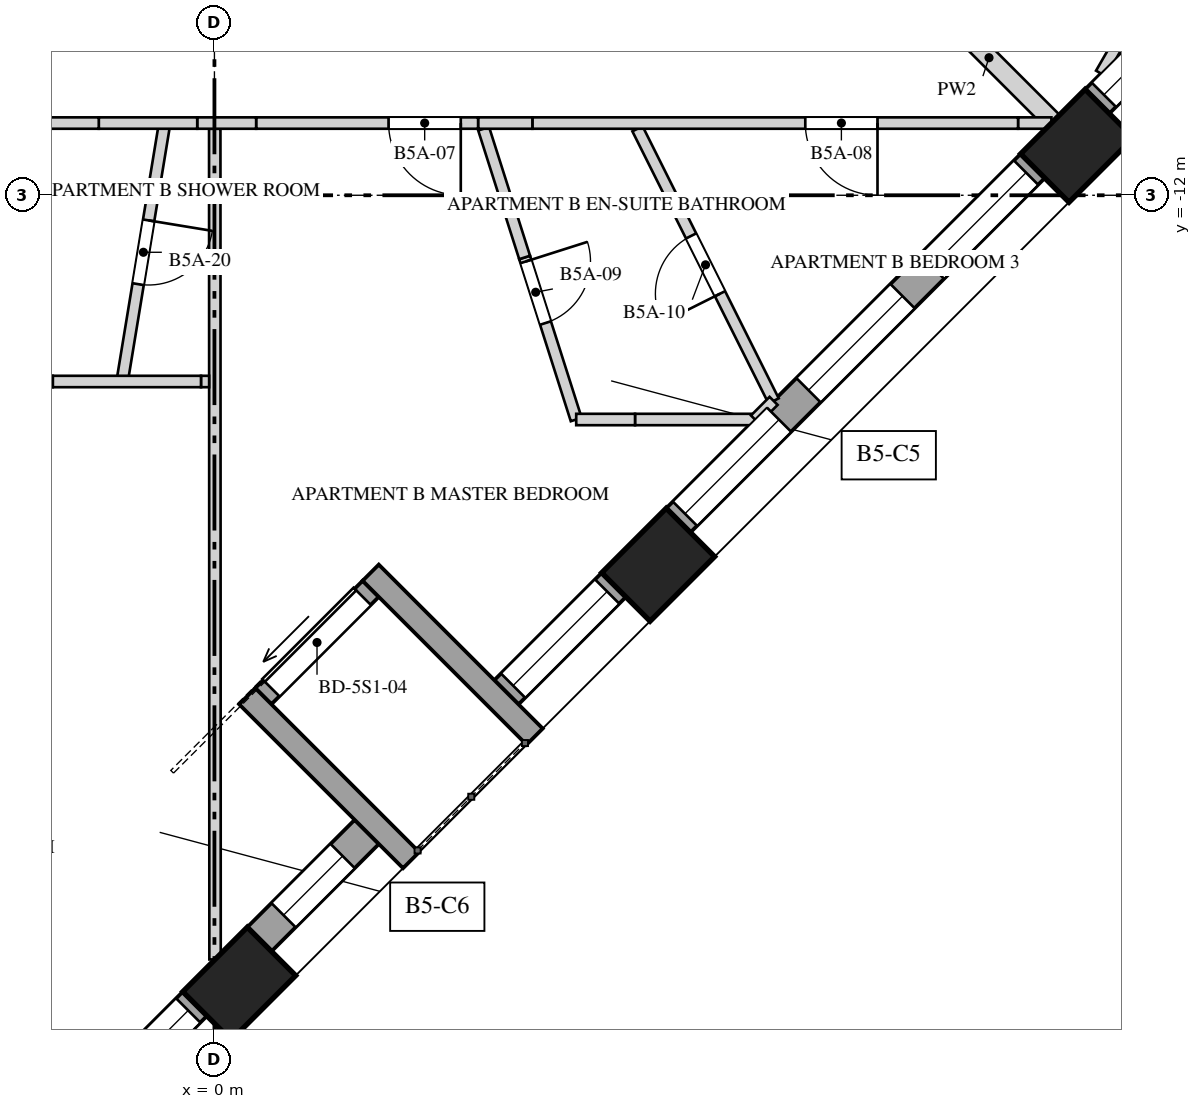
"""IFC4 building model, lengths in metres.
Left out: names, types, materials, properties, quantities, classifications, styles, units other than length and angle.
Written with IfcOpenShell. Run it as: python <this file> out.ifc"""

import sys

from ifc_helpers import new_model, si_unit, direction, frame, frame_2d, origin, origin_2d, place, context, subcontext, project, spatial, rectangle, extrude, element, fill, save


model = new_model("IFC4")
c1 = context("Model", 3, precision=1e-05, world=origin(), true_north=direction((0.0, 1.0)))
c2 = subcontext(c1, "Body", "Model", "MODEL_VIEW")
j1 = project(units=[si_unit("LENGTHUNIT", "METRE"), si_unit("PLANEANGLEUNIT", "RADIAN")], contexts=[c1])
p1 = place(None, origin())
s1 = spatial("IfcSite", under=j1, at=p1, CompositionType="ELEMENT")
p2 = place(p1, origin())
s2 = spatial("IfcBuilding", under=s1, at=p2, CompositionType="ELEMENT")
p3 = place(p2, frame((0.0, 0.0, 200.0)))
s3 = spatial("IfcBuildingStorey", under=s2, at=p3, CompositionType="ELEMENT", Elevation=200.0)
for number, where, z_axis, x_axis in (
    (1, (0.326, -22.372, -0.35), (0.0, 0.0, 1.0), (0.707, 0.707, 0.0)),
    (2, (5.838, -16.86, -0.35), (0.0, 0.0, 1.0), (0.707, 0.707, 0.0)),
    (3, (11.349, -11.349, -0.35), (0.0, 0.0, 1.0), (0.707, 0.707, 0.0)),
):
    element("IfcColumn", number, at=place(p3, frame(where, z_axis=z_axis, x_axis=x_axis)), inside=s3, PredefinedType="COLUMN", context=c2, shape_type="SweptSolid", body=[
        extrude(rectangle(XDim=1.2, YDim=0.9, at=origin_2d()), origin(), (0.0, 0.0, 1.0), 4.35),
    ])
p4 = place(p3, frame((-4.496, -26.875, 0.0), z_axis=(0.0, 0.0, 1.0), x_axis=(0.707106781187, 0.707106781187, 0.0)))
e4 = element("IfcWall", 4, at=p4, inside=s3, PredefinedType="SOLIDWALL", context=c2, shape_type="SweptSolid", body=[
    extrude(rectangle(XDim=5.994, YDim=0.45, at=frame_2d((2.997, 0.0))), origin(), (0.0, 0.0, 1.0), 3.3),
])
p5 = place(p4, frame((0.149, 0.0, 0.5)))
e5 = element("IfcOpeningElement", 5, at=p5, cuts=e4, PredefinedType="OPENING", context=c2, shape_type="SweptSolid", body=[
    extrude(rectangle(XDim=1.1, YDim=2.0, at=frame_2d((0.55, 1.0))), frame((0.0, 0.235, 0.0), z_axis=(0.0, -1.0, 0.0), x_axis=(1.0, 0.0, 0.0)), (0.0, 0.0, 1.0), 0.47),
])
p6 = place(p4, frame((1.822, 0.0, 0.5)))
e6 = element("IfcOpeningElement", 6, at=p6, cuts=e4, PredefinedType="OPENING", context=c2, shape_type="SweptSolid", body=[
    extrude(rectangle(XDim=1.75, YDim=2.65, at=frame_2d((0.875, 1.325))), frame((0.0, 0.235, 0.0), z_axis=(0.0, -1.0, 0.0), x_axis=(1.0, 0.0, 0.0)), (0.0, 0.0, 1.0), 0.47),
])
p7 = place(p4, frame((4.12, 0.0, 0.5)))
e7 = element("IfcOpeningElement", 7, at=p7, cuts=e4, PredefinedType="OPENING", context=c2, shape_type="SweptSolid", body=[
    extrude(rectangle(XDim=1.75, YDim=2.65, at=frame_2d((0.875, 1.325))), frame((0.0, 0.235, 0.0), z_axis=(0.0, -1.0, 0.0), x_axis=(1.0, 0.0, 0.0)), (0.0, 0.0, 1.0), 0.47),
])
p8 = place(p3, frame((0.592, -21.788, 0.0), z_axis=(0.0, 0.0, 1.0), x_axis=(0.707106781187, 0.707106781187, 0.0)))
e8 = element("IfcWall", 8, at=p8, inside=s3, PredefinedType="SOLIDWALL", context=c2, shape_type="SweptSolid", body=[
    extrude(rectangle(XDim=1.998, YDim=0.45, at=frame_2d((0.999, 0.0))), origin(), (0.0, 0.0, 1.0), 3.3),
])
p9 = place(p8, frame((0.449, 0.0, 0.5)))
e9 = element("IfcOpeningElement", 9, at=p9, cuts=e8, PredefinedType="OPENING", context=c2, shape_type="SweptSolid", body=[
    extrude(rectangle(XDim=1.1, YDim=2.65, at=frame_2d((0.55, 1.325))), frame((0.0, 0.235, 0.0), z_axis=(0.0, -1.0, 0.0), x_axis=(1.0, 0.0, 0.0)), (0.0, 0.0, 1.0), 0.47),
])
p10 = place(p3, frame((3.842, -18.538, 0.0), z_axis=(0.0, 0.0, 1.0), x_axis=(0.707106781187, 0.707106781187, 0.0)))
e10 = element("IfcWall", 10, at=p10, inside=s3, PredefinedType="SOLIDWALL", context=c2, shape_type="SweptSolid", body=[
    extrude(rectangle(XDim=1.998, YDim=0.45, at=frame_2d((0.999, 0.0))), origin(), (0.0, 0.0, 1.0), 3.3),
])
p11 = place(p10, frame((0.124, 0.0, 0.5)))
e11 = element("IfcOpeningElement", 11, at=p11, cuts=e10, PredefinedType="OPENING", context=c2, shape_type="SweptSolid", body=[
    extrude(rectangle(XDim=1.75, YDim=2.65, at=frame_2d((0.875, 1.325))), frame((0.0, 0.235, 0.0), z_axis=(0.0, -1.0, 0.0), x_axis=(1.0, 0.0, 0.0)), (0.0, 0.0, 1.0), 0.47),
])
p12 = place(p3, frame((6.103, -16.277, 0.0), z_axis=(0.0, 0.0, 1.0), x_axis=(0.707106781187, 0.707106781187, 0.0)))
e12 = element("IfcWall", 12, at=p12, inside=s3, PredefinedType="SOLIDWALL", context=c2, shape_type="SweptSolid", body=[
    extrude(rectangle(XDim=6.594, YDim=0.45, at=frame_2d((3.297, 0.0))), origin(), (0.0, 0.0, 1.0), 3.3),
])
p13 = place(p12, frame((0.124, 0.0, 0.5)))
e13 = element("IfcOpeningElement", 13, at=p13, cuts=e12, PredefinedType="OPENING", context=c2, shape_type="SweptSolid", body=[
    extrude(rectangle(XDim=1.75, YDim=2.65, at=frame_2d((0.875, 1.325))), frame((0.0, 0.235, 0.0), z_axis=(0.0, -1.0, 0.0), x_axis=(1.0, 0.0, 0.0)), (0.0, 0.0, 1.0), 0.47),
])
p14 = place(p12, frame((2.422, 0.0, 0.5)))
e14 = element("IfcOpeningElement", 14, at=p14, cuts=e12, PredefinedType="OPENING", context=c2, shape_type="SweptSolid", body=[
    extrude(rectangle(XDim=1.75, YDim=2.65, at=frame_2d((0.875, 1.325))), frame((0.0, 0.235, 0.0), z_axis=(0.0, -1.0, 0.0), x_axis=(1.0, 0.0, 0.0)), (0.0, 0.0, 1.0), 0.47),
])
p15 = place(p12, frame((4.72, 0.0, 0.5)))
e15 = element("IfcOpeningElement", 15, at=p15, cuts=e12, PredefinedType="OPENING", context=c2, shape_type="SweptSolid", body=[
    extrude(rectangle(XDim=1.75, YDim=2.65, at=frame_2d((0.875, 1.325))), frame((0.0, 0.235, 0.0), z_axis=(0.0, -1.0, 0.0), x_axis=(1.0, 0.0, 0.0)), (0.0, 0.0, 1.0), 0.47),
])
p16 = place(p3, frame((11.614, -10.766, 0.0), z_axis=(0.0, 0.0, 1.0), x_axis=(0.707106781187, 0.707106781187, 0.0)))
e16 = element("IfcWall", 16, at=p16, inside=s3, PredefinedType="SOLIDWALL", context=c2, shape_type="SweptSolid", body=[
    extrude(rectangle(XDim=6.594, YDim=0.45, at=frame_2d((3.297, 0.0))), origin(), (0.0, 0.0, 1.0), 3.3),
])
p17 = place(p16, frame((0.124, 0.0, 0.5)))
e17 = element("IfcOpeningElement", 17, at=p17, cuts=e16, PredefinedType="OPENING", context=c2, shape_type="SweptSolid", body=[
    extrude(rectangle(XDim=1.75, YDim=2.65, at=frame_2d((0.875, 1.325))), frame((0.0, 0.235, 0.0), z_axis=(0.0, -1.0, 0.0), x_axis=(1.0, 0.0, 0.0)), (0.0, 0.0, 1.0), 0.47),
])
p18 = place(p16, frame((2.422, 0.0, 0.5)))
e18 = element("IfcOpeningElement", 18, at=p18, cuts=e16, PredefinedType="OPENING", context=c2, shape_type="SweptSolid", body=[
    extrude(rectangle(XDim=1.75, YDim=2.65, at=frame_2d((0.875, 1.325))), frame((0.0, 0.235, 0.0), z_axis=(0.0, -1.0, 0.0), x_axis=(1.0, 0.0, 0.0)), (0.0, 0.0, 1.0), 0.47),
])
p19 = place(p16, frame((4.72, 0.0, 0.5)))
e19 = element("IfcOpeningElement", 19, at=p19, cuts=e16, PredefinedType="OPENING", context=c2, shape_type="SweptSolid", body=[
    extrude(rectangle(XDim=1.75, YDim=2.65, at=frame_2d((0.875, 1.325))), frame((0.0, 0.235, 0.0), z_axis=(0.0, -1.0, 0.0), x_axis=(1.0, 0.0, 0.0)), (0.0, 0.0, 1.0), 0.47),
])
p20 = place(p3, frame((0.643, -18.59, 0.0), z_axis=(0.0, 0.0, 1.0), x_axis=(0.707106781187, 0.707106781187, 0.0)))
e20 = element("IfcWall", 20, at=p20, inside=s3, PredefinedType="SOLIDWALL", context=c2, shape_type="SweptSolid", body=[
    extrude(rectangle(XDim=1.998, YDim=0.3, at=frame_2d((0.999, 0.0))), origin(), (0.0, 0.0, 1.0), 3.3),
])
p21 = place(p20, frame((0.149, 0.0, 0.0)))
e21 = element("IfcOpeningElement", 21, at=p21, cuts=e20, PredefinedType="OPENING", context=c2, shape_type="SweptSolid", body=[
    extrude(rectangle(XDim=1.7, YDim=2.45, at=frame_2d((0.85, 1.225))), frame((0.0, 0.16, 0.0), z_axis=(0.0, -1.0, 0.0), x_axis=(1.0, 0.0, 0.0)), (0.0, 0.0, 1.0), 0.32),
])
for number, where, z_axis, x_axis in (
    (22, (2.588, -20.747, 0.0), (0.0, 0.0, 1.0), (-0.707, 0.707, 0.0)),
    (23, (4.213, -19.122, 0.0), (0.0, 0.0, 1.0), (-0.707, 0.707, 0.0)),
):
    element("IfcWall", number, at=place(p3, frame(where, z_axis=z_axis, x_axis=x_axis)), inside=s3, PredefinedType="SOLIDWALL", context=c2, shape_type="SweptSolid", body=[
        extrude(rectangle(XDim=3.05, YDim=0.3, at=frame_2d((1.525, 0.0))), origin(), (0.0, 0.0, 1.0), 3.3),
    ])
p22 = place(p3, frame((-0.655, -11.052, 0.0), z_axis=(0.0, 0.0, 1.0), x_axis=(-0.162305002106, -0.986740637803, 0.0)))
e24 = element("IfcWall", 24, at=p22, inside=s3, PredefinedType="PARTITIONING", context=c2, shape_type="SweptSolid", body=[
    extrude(rectangle(XDim=3.442, YDim=0.15, at=frame_2d((1.721, 0.0))), origin(), (0.0, 0.0, 1.0), 3.65),
])
p23 = place(p22, frame((1.296, 0.0, 0.0)))
e25 = element("IfcOpeningElement", 25, at=p23, cuts=e24, PredefinedType="OPENING", context=c2, shape_type="SweptSolid", body=[
    extrude(rectangle(XDim=0.85, YDim=2.4, at=frame_2d((0.425, 1.2))), frame((0.0, 0.085, 0.0), z_axis=(0.0, -1.0, 0.0), x_axis=(1.0, 0.0, 0.0)), (0.0, 0.0, 1.0), 0.17),
])
p24 = place(p3, frame((0.004, -11.125, 0.0), z_axis=(0.0, 0.0, 1.0), x_axis=(0.00035743804, -0.999999936119, 0.0)))
e26 = element("IfcWall", 26, at=p24, inside=s3, PredefinedType="PARTITIONING", context=c2, shape_type="SweptSolid", body=[
    extrude(rectangle(XDim=10.928, YDim=0.15, at=frame_2d((5.464, 0.0))), origin(), (0.0, 0.0, 1.0), 2.75),
])
p25 = place(p3, frame((-0.07, -14.45, 0.0), z_axis=(0.0, 0.0, 1.0), x_axis=(-1.0, 0.0, 0.0)))
e27 = element("IfcWall", 27, at=p25, inside=s3, PredefinedType="PARTITIONING", context=c2, shape_type="SweptSolid", body=[
    extrude(rectangle(XDim=0.107, YDim=0.15, at=frame_2d((0.054, 0.0))), origin(), (0.0, 0.0, 1.0), 2.75),
])
p26 = place(p3, frame((-0.177, -14.45, 0.0), z_axis=(0.0, 0.0, 1.0), x_axis=(-1.0, 0.0, 0.0)))
e28 = element("IfcWall", 28, at=p26, inside=s3, PredefinedType="PARTITIONING", context=c2, shape_type="SweptSolid", body=[
    extrude(rectangle(XDim=1.95, YDim=0.15, at=frame_2d((0.975, 0.0))), origin(), (0.0, 0.0, 1.0), 3.65),
])
p27 = place(p3, frame((4.081, -12.818, 0.0), z_axis=(0.0, 0.0, 1.0), x_axis=(0.303365803951, -0.952874172697, 0.0)))
e29 = element("IfcWall", 29, at=p27, inside=s3, PredefinedType="PARTITIONING", context=c2, shape_type="SweptSolid", body=[
    extrude(rectangle(XDim=2.237, YDim=0.15, at=frame_2d((1.119, 0.0))), origin(), (0.0, 0.0, 1.0), 3.65),
])
p28 = place(p27, frame((0.055, 0.0, 0.0)))
e30 = element("IfcOpeningElement", 30, at=p28, cuts=e29, PredefinedType="OPENING", context=c2, shape_type="SweptSolid", body=[
    extrude(rectangle(XDim=0.85, YDim=2.4, at=frame_2d((0.425, 1.2))), frame((0.0, 0.085, 0.0), z_axis=(0.0, -1.0, 0.0), x_axis=(1.0, 0.0, 0.0)), (0.0, 0.0, 1.0), 0.17),
])
p29 = place(p3, frame((4.081, -12.818, 0.0), z_axis=(0.0, 0.0, 1.0), x_axis=(-0.3033794624, 0.95286982416, 0.0)))
e31 = element("IfcWall", 31, at=p29, inside=s3, PredefinedType="PARTITIONING", context=c2, shape_type="SweptSolid", body=[
    extrude(rectangle(XDim=1.777, YDim=0.15, at=frame_2d((0.888, 0.0))), origin(), (0.0, 0.0, 1.0), 2.95),
])
p30 = place(p3, frame((7.357, -14.705, 0.0), z_axis=(0.0, 0.0, 1.0), x_axis=(-0.447408746794, 0.894329588738, 0.0)))
e32 = element("IfcWall", 32, at=p30, inside=s3, PredefinedType="PARTITIONING", context=c2, shape_type="SweptSolid", body=[
    extrude(rectangle(XDim=4.003, YDim=0.15, at=frame_2d((2.001, 0.0))), origin(), (0.0, 0.0, 1.0), 3.65),
])
p31 = place(p30, frame((1.577, 0.0, 0.0)))
e33 = element("IfcOpeningElement", 33, at=p31, cuts=e32, PredefinedType="OPENING", context=c2, shape_type="SweptSolid", body=[
    extrude(rectangle(XDim=0.85, YDim=2.4, at=frame_2d((0.425, 1.2))), frame((0.0, 0.085, 0.0), z_axis=(0.0, -1.0, 0.0), x_axis=(1.0, 0.0, 0.0)), (0.0, 0.0, 1.0), 0.17),
])
p32 = place(p3, frame((7.112, -14.95, 0.0), z_axis=(0.0, 0.0, 1.0), x_axis=(-1.0, 0.0, 0.0)))
e34 = element("IfcWall", 34, at=p32, inside=s3, PredefinedType="PARTITIONING", context=c2, shape_type="SweptSolid", body=[
    extrude(rectangle(XDim=1.578, YDim=0.15, at=frame_2d((0.789, 0.0))), origin(), (0.0, 0.0, 1.0), 3.65),
])
p33 = place(p3, frame((5.533, -14.95, 0.0), z_axis=(0.0, 0.0, 1.0), x_axis=(-1.0, 0.0, 0.0)))
e35 = element("IfcWall", 35, at=p33, inside=s3, PredefinedType="PARTITIONING", context=c2, shape_type="SweptSolid", body=[
    extrude(rectangle(XDim=0.774, YDim=0.15, at=frame_2d((0.387, 0.0))), origin(), (0.0, 0.0, 1.0), 2.95),
])
p34 = place(p3, frame((9.35, -9.35, 0.0), z_axis=(0.0, 0.0, 1.0), x_axis=(0.707106781187, -0.707106781187, 0.0)))
e36 = element("IfcWall", 36, at=p34, inside=s3, PredefinedType="SOLIDWALL", context=c2, shape_type="SweptSolid", body=[
    extrude(rectangle(XDim=2.377, YDim=0.25, at=frame_2d((1.188, 0.0))), origin(), (0.0, 0.0, 1.0), 2.95),
])
p35 = place(p3, frame((11.012, -11.05, 0.0), z_axis=(0.0, 0.0, 1.0), x_axis=(-1.0, 0.0, 0.0)))
e37 = element("IfcWall", 37, at=p35, inside=s3, PredefinedType="PARTITIONING", context=c2, shape_type="SweptSolid", body=[
    extrude(rectangle(XDim=0.439, YDim=0.15, at=frame_2d((0.219, 0.0))), origin(), (0.0, 0.0, 1.0), 2.95),
])
p36 = place(p3, frame((10.573, -11.05, 0.0), z_axis=(0.0, 0.0, 1.0), x_axis=(-1.0, 0.0, 0.0)))
e38 = element("IfcWall", 38, at=p36, inside=s3, PredefinedType="PARTITIONING", context=c2, shape_type="SweptSolid", body=[
    extrude(rectangle(XDim=6.39, YDim=0.15, at=frame_2d((3.195, 0.0))), origin(), (0.0, 0.0, 1.0), 3.65),
])
p37 = place(p36, frame((1.849, 0.0, 0.0)))
e39 = element("IfcOpeningElement", 39, at=p37, cuts=e38, PredefinedType="OPENING", context=c2, shape_type="SweptSolid", body=[
    extrude(rectangle(XDim=0.95, YDim=2.4, at=frame_2d((0.475, 1.2))), frame((0.0, 0.085, 0.0), z_axis=(0.0, -1.0, 0.0), x_axis=(1.0, 0.0, 0.0)), (0.0, 0.0, 1.0), 0.17),
])
p38 = place(p3, frame((4.183, -11.05, 0.0), z_axis=(0.0, 0.0, 1.0), x_axis=(-1.0, 0.0, 0.0)))
e40 = element("IfcWall", 40, at=p38, inside=s3, PredefinedType="PARTITIONING", context=c2, shape_type="SweptSolid", body=[
    extrude(rectangle(XDim=0.714, YDim=0.15, at=frame_2d((0.357, 0.0))), origin(), (0.0, 0.0, 1.0), 2.95),
])
p39 = place(p3, frame((3.469, -11.05, 0.0), z_axis=(0.0, 0.0, 1.0), x_axis=(-1.0, 0.0, 0.0)))
e41 = element("IfcWall", 41, at=p39, inside=s3, PredefinedType="PARTITIONING", context=c2, shape_type="SweptSolid", body=[
    extrude(rectangle(XDim=2.92, YDim=0.15, at=frame_2d((1.46, 0.0))), origin(), (0.0, 0.0, 1.0), 3.65),
])
p40 = place(p39, frame((0.228, 0.0, 0.0)))
e42 = element("IfcOpeningElement", 42, at=p40, cuts=e41, PredefinedType="OPENING", context=c2, shape_type="SweptSolid", body=[
    extrude(rectangle(XDim=0.95, YDim=2.4, at=frame_2d((0.475, 1.2))), frame((0.0, 0.085, 0.0), z_axis=(0.0, -1.0, 0.0), x_axis=(1.0, 0.0, 0.0)), (0.0, 0.0, 1.0), 0.17),
])
p41 = place(p3, frame((0.549, -11.05, 0.0), z_axis=(0.0, 0.0, 1.0), x_axis=(-1.0, 0.0, 0.0)))
e43 = element("IfcWall", 43, at=p41, inside=s3, PredefinedType="PARTITIONING", context=c2, shape_type="SweptSolid", body=[
    extrude(rectangle(XDim=0.775, YDim=0.15, at=frame_2d((0.388, 0.0))), origin(), (0.0, 0.0, 1.0), 2.75),
])
p42 = place(p3, frame((-0.226, -11.05, 0.0), z_axis=(0.0, 0.0, 1.0), x_axis=(-1.0, 0.0, 0.0)))
e44 = element("IfcWall", 44, at=p42, inside=s3, PredefinedType="PARTITIONING", context=c2, shape_type="SweptSolid", body=[
    extrude(rectangle(XDim=1.295, YDim=0.15, at=frame_2d((0.648, 0.0))), origin(), (0.0, 0.0, 1.0), 3.65),
])
p43 = place(p3, frame((-1.522, -11.05, 0.0), z_axis=(0.0, 0.0, 1.0), x_axis=(-1.0, 0.0, 0.0)))
e45 = element("IfcWall", 45, at=p43, inside=s3, PredefinedType="PARTITIONING", context=c2, shape_type="SweptSolid", body=[
    extrude(rectangle(XDim=0.889, YDim=0.15, at=frame_2d((0.444, 0.0))), origin(), (0.0, 0.0, 1.0), 2.55),
])
p44 = place(p3, frame((14.552, -5.396, 0.0), z_axis=(0.0, 0.0, 1.0), x_axis=(-0.499984646442, -0.866034267984, 0.0)))
e46 = element("IfcWall", 46, at=p44, inside=s3, PredefinedType="PARTITIONING", context=c2, shape_type="SweptSolid", body=[
    extrude(rectangle(XDim=5.777, YDim=0.15, at=frame_2d((2.888, 0.0))), origin(), (0.0, 0.0, 1.0), 3.65),
])
p45 = place(p44, frame((1.752, 0.0, 0.0)))
e47 = element("IfcOpeningElement", 47, at=p45, cuts=e46, PredefinedType="OPENING", context=c2, shape_type="SweptSolid", body=[
    extrude(rectangle(XDim=0.95, YDim=2.4, at=frame_2d((0.475, 1.2))), frame((0.0, 0.085, 0.0), z_axis=(0.0, -1.0, 0.0), x_axis=(1.0, 0.0, 0.0)), (0.0, 0.0, 1.0), 0.17),
])
p46 = place(p3, frame((7.357, -14.705, 0.0), z_axis=(0.0, 0.0, 1.0), x_axis=(-0.707106781187, -0.707106781187, 0.0)))
e48 = element("IfcWall", 48, at=p46, inside=s3, PredefinedType="PARTITIONING", context=c2, shape_type="SweptSolid", body=[
    extrude(rectangle(XDim=0.346, YDim=0.15, at=frame_2d((0.173, 0.0))), origin(), (0.0, 0.0, 1.0), 3.65),
])
p47 = place(p7, origin())
e49 = element("IfcWindow", 49, at=p47, inside=s3, PartitioningType="SINGLE_PANEL", PredefinedType="WINDOW", context=c2, shape_type="SweptSolid", body=[
    extrude(rectangle(XDim=1.75, YDim=2.65, at=frame_2d((0.875, 1.325))), frame((0.0, 0.03, 0.0), z_axis=(0.0, -1.0, 0.0), x_axis=(1.0, 0.0, 0.0)), (0.0, 0.0, 1.0), 0.06),
])
fill(e7, e49)
p48 = place(p9, origin())
e50 = element("IfcWindow", 50, at=p48, inside=s3, PartitioningType="SINGLE_PANEL", PredefinedType="WINDOW", context=c2, shape_type="SweptSolid", body=[
    extrude(rectangle(XDim=1.1, YDim=2.65, at=frame_2d((0.55, 1.325))), frame((0.0, 0.03, 0.0), z_axis=(0.0, -1.0, 0.0), x_axis=(1.0, 0.0, 0.0)), (0.0, 0.0, 1.0), 0.06),
])
fill(e9, e50)
p49 = place(p11, origin())
e51 = element("IfcWindow", 51, at=p49, inside=s3, PartitioningType="SINGLE_PANEL", PredefinedType="WINDOW", context=c2, shape_type="SweptSolid", body=[
    extrude(rectangle(XDim=1.75, YDim=2.65, at=frame_2d((0.875, 1.325))), frame((0.0, 0.03, 0.0), z_axis=(0.0, -1.0, 0.0), x_axis=(1.0, 0.0, 0.0)), (0.0, 0.0, 1.0), 0.06),
])
fill(e11, e51)
p50 = place(p13, origin())
e52 = element("IfcWindow", 52, at=p50, inside=s3, PartitioningType="SINGLE_PANEL", PredefinedType="WINDOW", context=c2, shape_type="SweptSolid", body=[
    extrude(rectangle(XDim=1.75, YDim=2.65, at=frame_2d((0.875, 1.325))), frame((0.0, 0.03, 0.0), z_axis=(0.0, -1.0, 0.0), x_axis=(1.0, 0.0, 0.0)), (0.0, 0.0, 1.0), 0.06),
])
fill(e13, e52)
p51 = place(p14, origin())
e53 = element("IfcWindow", 53, at=p51, inside=s3, PartitioningType="SINGLE_PANEL", PredefinedType="WINDOW", context=c2, shape_type="SweptSolid", body=[
    extrude(rectangle(XDim=1.75, YDim=2.65, at=frame_2d((0.875, 1.325))), frame((0.0, 0.03, 0.0), z_axis=(0.0, -1.0, 0.0), x_axis=(1.0, 0.0, 0.0)), (0.0, 0.0, 1.0), 0.06),
])
fill(e14, e53)
p52 = place(p15, origin())
e54 = element("IfcWindow", 54, at=p52, inside=s3, PartitioningType="SINGLE_PANEL", PredefinedType="WINDOW", context=c2, shape_type="SweptSolid", body=[
    extrude(rectangle(XDim=1.75, YDim=2.65, at=frame_2d((0.875, 1.325))), frame((0.0, 0.03, 0.0), z_axis=(0.0, -1.0, 0.0), x_axis=(1.0, 0.0, 0.0)), (0.0, 0.0, 1.0), 0.06),
])
fill(e15, e54)
p53 = place(p17, origin())
e55 = element("IfcWindow", 55, at=p53, inside=s3, PartitioningType="SINGLE_PANEL", PredefinedType="WINDOW", context=c2, shape_type="SweptSolid", body=[
    extrude(rectangle(XDim=1.75, YDim=2.65, at=frame_2d((0.875, 1.325))), frame((0.0, 0.03, 0.0), z_axis=(0.0, -1.0, 0.0), x_axis=(1.0, 0.0, 0.0)), (0.0, 0.0, 1.0), 0.06),
])
fill(e17, e55)
p54 = place(p21, origin())
e56 = element("IfcDoor", 56, at=p54, inside=s3, OperationType="SLIDING_TO_LEFT", PredefinedType="DOOR", context=c2, shape_type="SweptSolid", body=[
    extrude(rectangle(XDim=1.7, YDim=2.45, at=frame_2d((0.85, 1.225))), frame((0.0, 0.025, 0.0), z_axis=(0.0, -1.0, 0.0), x_axis=(1.0, 0.0, 0.0)), (0.0, 0.0, 1.0), 0.05),
])
fill(e21, e56)
p55 = place(p40, origin())
e57 = element("IfcDoor", 57, at=p55, inside=s3, OperationType="SINGLE_SWING_LEFT", PredefinedType="DOOR", context=c2, shape_type="SweptSolid", body=[
    extrude(rectangle(XDim=0.95, YDim=2.4, at=frame_2d((0.475, 1.2))), frame((0.0, 0.025, 0.0), z_axis=(0.0, -1.0, 0.0), x_axis=(1.0, 0.0, 0.0)), (0.0, 0.0, 1.0), 0.05),
])
fill(e42, e57)
p56 = place(p37, origin())
e58 = element("IfcDoor", 58, at=p56, inside=s3, OperationType="SINGLE_SWING_RIGHT", PredefinedType="DOOR", context=c2, shape_type="SweptSolid", body=[
    extrude(rectangle(XDim=0.95, YDim=2.4, at=frame_2d((0.475, 1.2))), frame((0.0, 0.025, 0.0), z_axis=(0.0, -1.0, 0.0), x_axis=(1.0, 0.0, 0.0)), (0.0, 0.0, 1.0), 0.05),
])
fill(e39, e58)
p57 = place(p28, origin())
e59 = element("IfcDoor", 59, at=p57, inside=s3, OperationType="SINGLE_SWING_LEFT", PredefinedType="DOOR", context=c2, shape_type="SweptSolid", body=[
    extrude(rectangle(XDim=0.85, YDim=2.4, at=frame_2d((0.425, 1.2))), frame((0.0, 0.025, 0.0), z_axis=(0.0, -1.0, 0.0), x_axis=(1.0, 0.0, 0.0)), (0.0, 0.0, 1.0), 0.05),
])
fill(e30, e59)
p58 = place(p31, origin())
e60 = element("IfcDoor", 60, at=p58, inside=s3, OperationType="SINGLE_SWING_RIGHT", PredefinedType="DOOR", context=c2, shape_type="SweptSolid", body=[
    extrude(rectangle(XDim=0.85, YDim=2.4, at=frame_2d((0.425, 1.2))), frame((0.0, 0.025, 0.0), z_axis=(0.0, -1.0, 0.0), x_axis=(1.0, 0.0, 0.0)), (0.0, 0.0, 1.0), 0.05),
])
fill(e33, e60)
p59 = place(p23, origin())
e61 = element("IfcDoor", 61, at=p59, inside=s3, OperationType="SINGLE_SWING_RIGHT", PredefinedType="DOOR", context=c2, shape_type="SweptSolid", body=[
    extrude(rectangle(XDim=0.85, YDim=2.4, at=frame_2d((0.425, 1.2))), frame((0.0, 0.025, 0.0), z_axis=(0.0, -1.0, 0.0), x_axis=(1.0, 0.0, 0.0)), (0.0, 0.0, 1.0), 0.05),
])
fill(e25, e61)
save(model, sys.argv[1])
